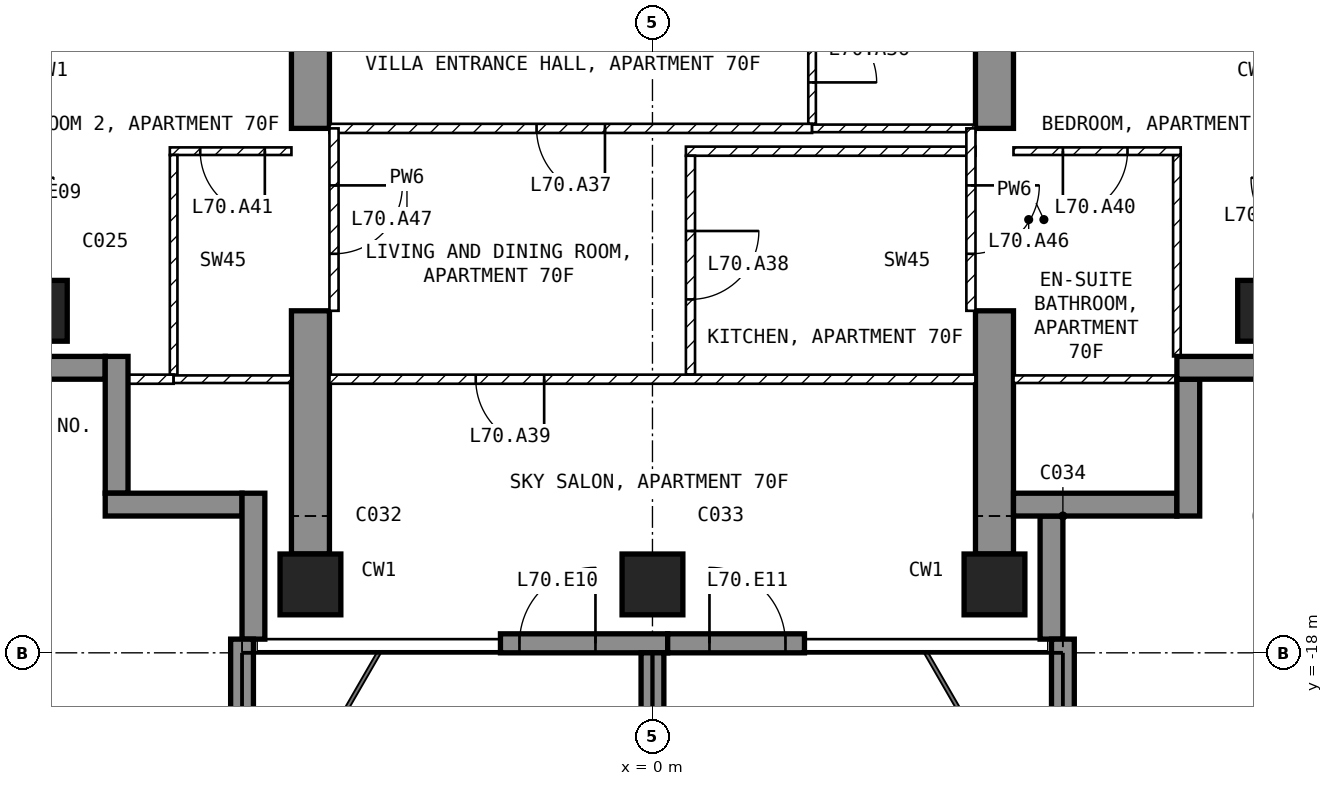
"""IFC4 building model, lengths in metres.
Left out: names, types, materials, properties, quantities, classifications, styles, units other than length and angle.
Written with IfcOpenShell. Run it as: python <this file> out.ifc"""

import sys

from ifc_helpers import new_model, si_unit, direction, frame, frame_2d, origin, origin_2d, place, context, subcontext, project, spatial, polyline, rectangle, outline, extrude, element, fill, save


model = new_model("IFC4")
c1 = context("Model", 3, precision=1e-05, world=origin(), true_north=direction((0.0, 1.0)))
c2 = subcontext(c1, "Body", "Model", "MODEL_VIEW")
j1 = project(units=[si_unit("LENGTHUNIT", "METRE"), si_unit("PLANEANGLEUNIT", "RADIAN")], contexts=[c1])
p1 = place(None, origin())
s1 = spatial("IfcSite", under=j1, at=p1, CompositionType="ELEMENT")
p2 = place(p1, origin())
s2 = spatial("IfcBuilding", under=s1, at=p2, CompositionType="ELEMENT")
p3 = place(p2, frame((0.0, 0.0, 274.5)))
s3 = spatial("IfcBuildingStorey", under=s2, at=p3, CompositionType="ELEMENT", Elevation=274.5)
for number, where, z_axis, x_axis in (
    (1, (-8.1, -13.5, -0.25), (0.0, 0.0, 1.0), (1.0, 0.0, 0.0)),
    (2, (-4.5, -17.1, -0.25), (0.0, 0.0, 1.0), (1.0, 0.0, 0.0)),
    (3, (0.0, -17.1, -0.25), (0.0, 0.0, 1.0), (1.0, 0.0, 0.0)),
    (4, (4.5, -17.1, -0.25), (0.0, 0.0, 1.0), (1.0, 0.0, 0.0)),
    (5, (8.1, -13.5, -0.25), (0.0, 0.0, 1.0), (1.0, 0.0, 0.0)),
):
    element("IfcColumn", number, at=place(p3, frame(where, z_axis=z_axis, x_axis=x_axis)), inside=s3, PredefinedType="COLUMN", context=c2, shape_type="SweptSolid", body=[
        extrude(rectangle(XDim=0.8, YDim=0.8, at=origin_2d()), origin(), (0.0, 0.0, 1.0), 3.5),
    ])
for number, where, z_axis, x_axis in (
    (6, (-4.75, -16.7, -0.25), (1.0, 0.0, 0.0), (0.0, 1.0, 0.0)),
    (7, (4.25, -16.7, -0.25), (1.0, 0.0, 0.0), (0.0, 1.0, 0.0)),
):
    element("IfcWall", number, at=place(p3, frame(where, z_axis=z_axis, x_axis=x_axis)), inside=s3, PredefinedType="SHEAR", context=c2, shape_type="SweptSolid", body=[
        extrude(outline(polyline([(0.0, 0.0), (3.2, 0.0), (3.2, 2.65), (5.6, 2.65), (5.6, 0.0), (7.7, 0.0), (7.7, 3.5), (0.0, 3.5), (0.0, 0.0)])), origin(), (0.0, 0.0, 1.0), 0.5),
    ])
p4 = place(p3, frame((-2.0, -17.875, 0.0), z_axis=(0.0, 0.0, 1.0), x_axis=(1.0, 0.0, 0.0)))
e8 = element("IfcWall", 8, at=p4, inside=s3, PredefinedType="SOLIDWALL", context=c2, shape_type="SweptSolid", body=[
    extrude(rectangle(XDim=2.2, YDim=0.25, at=frame_2d((1.1, 0.0))), origin(), (0.0, 0.0, 1.0), 3.25),
])
p5 = place(p4, frame((0.25, 0.0, 0.0)))
e9 = element("IfcOpeningElement", 9, at=p5, cuts=e8, PredefinedType="OPENING", context=c2, shape_type="SweptSolid", body=[
    extrude(rectangle(XDim=1.0, YDim=2.4, at=frame_2d((0.5, 1.2))), frame((0.0, 0.135, 0.0), z_axis=(0.0, -1.0, 0.0), x_axis=(1.0, 0.0, 0.0)), (0.0, 0.0, 1.0), 0.27),
])
p6 = place(p3, frame((0.2, -17.875, 0.0), z_axis=(0.0, 0.0, 1.0), x_axis=(1.0, 0.0, 0.0)))
e10 = element("IfcWall", 10, at=p6, inside=s3, PredefinedType="SOLIDWALL", context=c2, shape_type="SweptSolid", body=[
    extrude(rectangle(XDim=1.8, YDim=0.25, at=frame_2d((0.9, 0.0))), origin(), (0.0, 0.0, 1.0), 3.25),
])
p7 = place(p6, frame((0.55, 0.0, 0.0)))
e11 = element("IfcOpeningElement", 11, at=p7, cuts=e10, PredefinedType="OPENING", context=c2, shape_type="SweptSolid", body=[
    extrude(rectangle(XDim=1.0, YDim=2.4, at=frame_2d((0.5, 1.2))), frame((0.0, 0.135, 0.0), z_axis=(0.0, -1.0, 0.0), x_axis=(1.0, 0.0, 0.0)), (0.0, 0.0, 1.0), 0.27),
])
p8 = place(p3, frame((5.25, -17.82, 0.0), z_axis=(0.0, 0.0, 1.0), x_axis=(0.0, 1.0, 0.0)))
e12 = element("IfcWall", 12, at=p8, inside=s3, PredefinedType="SOLIDWALL", context=c2, shape_type="SweptSolid", body=[
    extrude(rectangle(XDim=1.62, YDim=0.3, at=frame_2d((0.81, 0.0))), origin(), (0.0, 0.0, 1.0), 3.25),
])
p9 = place(p3, frame((4.75, -16.05, 0.0), z_axis=(0.0, 0.0, 1.0), x_axis=(1.0, 0.0, 0.0)))
e13 = element("IfcWall", 13, at=p9, inside=s3, PredefinedType="SOLIDWALL", context=c2, shape_type="SweptSolid", body=[
    extrude(rectangle(XDim=2.15, YDim=0.3, at=frame_2d((1.075, 0.0))), origin(), (0.0, 0.0, 1.0), 3.25),
])
p10 = place(p3, frame((7.05, -16.2, 0.0), z_axis=(0.0, 0.0, 1.0), x_axis=(0.0, 1.0, 0.0)))
e14 = element("IfcWall", 14, at=p10, inside=s3, PredefinedType="SOLIDWALL", context=c2, shape_type="SweptSolid", body=[
    extrude(rectangle(XDim=1.8, YDim=0.3, at=frame_2d((0.9, 0.0))), origin(), (0.0, 0.0, 1.0), 3.25),
])
p11 = place(p3, frame((6.9, -14.25, 0.0), z_axis=(0.0, 0.0, 1.0), x_axis=(1.0, 0.0, 0.0)))
e15 = element("IfcWall", 15, at=p11, inside=s3, PredefinedType="SOLIDWALL", context=c2, shape_type="SweptSolid", body=[
    extrude(rectangle(XDim=1.85, YDim=0.3, at=frame_2d((0.925, 0.0))), origin(), (0.0, 0.0, 1.0), 3.25),
])
p12 = place(p3, frame((-8.75, -14.25, 0.0), z_axis=(0.0, 0.0, 1.0), x_axis=(1.0, 0.0, 0.0)))
e16 = element("IfcWall", 16, at=p12, inside=s3, PredefinedType="SOLIDWALL", context=c2, shape_type="SweptSolid", body=[
    extrude(rectangle(XDim=1.55, YDim=0.3, at=frame_2d((0.775, 0.0))), origin(), (0.0, 0.0, 1.0), 3.25),
])
p13 = place(p3, frame((-7.05, -14.1, 0.0), z_axis=(0.0, 0.0, 1.0), x_axis=(0.0, -1.0, 0.0)))
e17 = element("IfcWall", 17, at=p13, inside=s3, PredefinedType="SOLIDWALL", context=c2, shape_type="SweptSolid", body=[
    extrude(rectangle(XDim=1.8, YDim=0.3, at=frame_2d((0.9, 0.0))), origin(), (0.0, 0.0, 1.0), 3.25),
])
p14 = place(p3, frame((-7.2, -16.05, 0.0), z_axis=(0.0, 0.0, 1.0), x_axis=(1.0, 0.0, 0.0)))
e18 = element("IfcWall", 18, at=p14, inside=s3, PredefinedType="SOLIDWALL", context=c2, shape_type="SweptSolid", body=[
    extrude(rectangle(XDim=1.8, YDim=0.3, at=frame_2d((0.9, 0.0))), origin(), (0.0, 0.0, 1.0), 3.25),
])
p15 = place(p3, frame((-5.25, -15.9, 0.0), z_axis=(0.0, 0.0, 1.0), x_axis=(0.0, -1.0, 0.0)))
e19 = element("IfcWall", 19, at=p15, inside=s3, PredefinedType="SOLIDWALL", context=c2, shape_type="SweptSolid", body=[
    extrude(rectangle(XDim=1.92, YDim=0.3, at=frame_2d((0.96, 0.0))), origin(), (0.0, 0.0, 1.0), 3.25),
])
p16 = place(p3, frame((-5.4, -17.82, 0.0), z_axis=(0.0, 0.0, 1.0), x_axis=(0.0, -1.0, 0.0)))
e20 = element("IfcWall", 20, at=p16, inside=s3, PredefinedType="SOLIDWALL", context=c2, shape_type="SweptSolid", body=[
    extrude(rectangle(XDim=2.88, YDim=0.3, at=frame_2d((1.44, 0.0))), origin(), (0.0, 0.0, 1.0), 3.25),
])
p17 = place(p3, frame((0.0, -18.0, 0.0), z_axis=(0.0, 0.0, 1.0), x_axis=(0.0, -1.0, 0.0)))
e21 = element("IfcWall", 21, at=p17, inside=s3, PredefinedType="SOLIDWALL", context=c2, shape_type="SweptSolid", body=[
    extrude(rectangle(XDim=2.7, YDim=0.3, at=frame_2d((1.35, 0.0))), origin(), (0.0, 0.0, 1.0), 3.25),
])
p18 = place(p3, frame((5.4, -17.82, 0.0), z_axis=(0.0, 0.0, 1.0), x_axis=(0.0, -1.0, 0.0)))
e22 = element("IfcWall", 22, at=p18, inside=s3, PredefinedType="SOLIDWALL", context=c2, shape_type="SweptSolid", body=[
    extrude(rectangle(XDim=2.88, YDim=0.3, at=frame_2d((1.44, 0.0))), origin(), (0.0, 0.0, 1.0), 3.25),
])
p19 = place(p3, frame((2.1, -9.1, 0.0), z_axis=(0.0, 0.0, 1.0), x_axis=(0.0, -1.0, 0.0)))
e23 = element("IfcWall", 23, at=p19, inside=s3, PredefinedType="PARTITIONING", context=c2, shape_type="SweptSolid", body=[
    extrude(rectangle(XDim=1.94, YDim=0.1, at=frame_2d((0.97, 0.0))), origin(), (0.0, 0.0, 1.0), 3.25),
])
p20 = place(p19, frame((0.545, 0.0, 0.0)))
e24 = element("IfcOpeningElement", 24, at=p20, cuts=e23, PredefinedType="OPENING", context=c2, shape_type="SweptSolid", body=[
    extrude(rectangle(XDim=0.85, YDim=2.1, at=frame_2d((0.425, 1.05))), frame((0.0, 0.06, 0.0), z_axis=(0.0, -1.0, 0.0), x_axis=(1.0, 0.0, 0.0)), (0.0, 0.0, 1.0), 0.12),
])
p21 = place(p3, frame((2.1, -11.1, 0.0), z_axis=(0.0, 0.0, 1.0), x_axis=(-1.0, 0.0, 0.0)))
e25 = element("IfcWall", 25, at=p21, inside=s3, PredefinedType="PARTITIONING", context=c2, shape_type="SweptSolid", body=[
    extrude(rectangle(XDim=6.35, YDim=0.12, at=frame_2d((3.175, 0.0))), origin(), (0.0, 0.0, 1.0), 3.25),
])
p22 = place(p21, frame((2.725, 0.0, 0.0)))
e26 = element("IfcOpeningElement", 26, at=p22, cuts=e25, PredefinedType="OPENING", context=c2, shape_type="SweptSolid", body=[
    extrude(rectangle(XDim=0.9, YDim=2.1, at=frame_2d((0.45, 1.05))), frame((0.0, 0.07, 0.0), z_axis=(0.0, -1.0, 0.0), x_axis=(1.0, 0.0, 0.0)), (0.0, 0.0, 1.0), 0.14),
])
p23 = place(p3, frame((4.25, -11.1, 0.0), z_axis=(0.0, 0.0, 1.0), x_axis=(-1.0, 0.0, 0.0)))
e27 = element("IfcWall", 27, at=p23, inside=s3, PredefinedType="PARTITIONING", context=c2, shape_type="SweptSolid", body=[
    extrude(rectangle(XDim=2.15, YDim=0.1, at=frame_2d((1.075, 0.0))), origin(), (0.0, 0.0, 1.0), 3.25),
])
p24 = place(p3, frame((4.25, -11.4, 0.0), z_axis=(0.0, 0.0, 1.0), x_axis=(-1.0, 0.0, 0.0)))
e28 = element("IfcWall", 28, at=p24, inside=s3, PredefinedType="PARTITIONING", context=c2, shape_type="SweptSolid", body=[
    extrude(rectangle(XDim=3.81, YDim=0.12, at=frame_2d((1.905, 0.0))), origin(), (0.0, 0.0, 1.0), 3.25),
])
p25 = place(p3, frame((0.5, -11.46, 0.0), z_axis=(0.0, 0.0, 1.0), x_axis=(0.0, -1.0, 0.0)))
e29 = element("IfcWall", 29, at=p25, inside=s3, PredefinedType="PARTITIONING", context=c2, shape_type="SweptSolid", body=[
    extrude(rectangle(XDim=2.88, YDim=0.12, at=frame_2d((1.44, 0.0))), origin(), (0.0, 0.0, 1.0), 3.25),
])
p26 = place(p25, frame((0.99, 0.0, 0.0)))
e30 = element("IfcOpeningElement", 30, at=p26, cuts=e29, PredefinedType="OPENING", context=c2, shape_type="SweptSolid", body=[
    extrude(rectangle(XDim=0.9, YDim=2.1, at=frame_2d((0.45, 1.05))), frame((0.0, 0.07, 0.0), z_axis=(0.0, -1.0, 0.0), x_axis=(1.0, 0.0, 0.0)), (0.0, 0.0, 1.0), 0.14),
])
p27 = place(p3, frame((4.25, -14.4, 0.0), z_axis=(0.0, 0.0, 1.0), x_axis=(-1.0, 0.0, 0.0)))
e31 = element("IfcWall", 31, at=p27, inside=s3, PredefinedType="PARTITIONING", context=c2, shape_type="SweptSolid", body=[
    extrude(rectangle(XDim=8.5, YDim=0.12, at=frame_2d((4.25, 0.0))), origin(), (0.0, 0.0, 1.0), 3.25),
])
p28 = place(p27, frame((5.675, 0.0, 0.0)))
e32 = element("IfcOpeningElement", 32, at=p28, cuts=e31, PredefinedType="OPENING", context=c2, shape_type="SweptSolid", body=[
    extrude(rectangle(XDim=0.9, YDim=2.1, at=frame_2d((0.45, 1.05))), frame((0.0, 0.07, 0.0), z_axis=(0.0, -1.0, 0.0), x_axis=(1.0, 0.0, 0.0)), (0.0, 0.0, 1.0), 0.14),
])
p29 = place(p3, frame((6.9, -14.1, 0.0), z_axis=(0.0, 0.0, 1.0), x_axis=(0.0, 1.0, 0.0)))
e33 = element("IfcWall", 33, at=p29, inside=s3, PredefinedType="PARTITIONING", context=c2, shape_type="SweptSolid", body=[
    extrude(rectangle(XDim=2.65, YDim=0.1, at=frame_2d((1.325, 0.0))), origin(), (0.0, 0.0, 1.0), 3.25),
])
p30 = place(p3, frame((6.95, -11.4, 0.0), z_axis=(0.0, 0.0, 1.0), x_axis=(-1.0, 0.0, 0.0)))
e34 = element("IfcWall", 34, at=p30, inside=s3, PredefinedType="PARTITIONING", context=c2, shape_type="SweptSolid", body=[
    extrude(rectangle(XDim=2.2, YDim=0.1, at=frame_2d((1.1, 0.0))), origin(), (0.0, 0.0, 1.0), 3.25),
])
p31 = place(p30, frame((0.7, 0.0, 0.0)))
e35 = element("IfcOpeningElement", 35, at=p31, cuts=e34, PredefinedType="OPENING", context=c2, shape_type="SweptSolid", body=[
    extrude(rectangle(XDim=0.85, YDim=2.1, at=frame_2d((0.425, 1.05))), frame((0.0, 0.06, 0.0), z_axis=(0.0, -1.0, 0.0), x_axis=(1.0, 0.0, 0.0)), (0.0, 0.0, 1.0), 0.12),
])
p32 = place(p3, frame((7.12, -14.4, 0.0), z_axis=(0.0, 0.0, 1.0), x_axis=(-1.0, 0.0, 0.0)))
e36 = element("IfcWall", 36, at=p32, inside=s3, PredefinedType="PARTITIONING", context=c2, shape_type="SweptSolid", body=[
    extrude(rectangle(XDim=2.37, YDim=0.1, at=frame_2d((1.185, 0.0))), origin(), (0.0, 0.0, 1.0), 3.25),
])
p33 = place(p3, frame((-4.75, -11.4, 0.0), z_axis=(0.0, 0.0, 1.0), x_axis=(-1.0, 0.0, 0.0)))
e37 = element("IfcWall", 37, at=p33, inside=s3, PredefinedType="PARTITIONING", context=c2, shape_type="SweptSolid", body=[
    extrude(rectangle(XDim=1.6, YDim=0.1, at=frame_2d((0.8, 0.0))), origin(), (0.0, 0.0, 1.0), 3.25),
])
p34 = place(p33, frame((0.35, 0.0, 0.0)))
e38 = element("IfcOpeningElement", 38, at=p34, cuts=e37, PredefinedType="OPENING", context=c2, shape_type="SweptSolid", body=[
    extrude(rectangle(XDim=0.85, YDim=2.1, at=frame_2d((0.425, 1.05))), frame((0.0, 0.06, 0.0), z_axis=(0.0, -1.0, 0.0), x_axis=(1.0, 0.0, 0.0)), (0.0, 0.0, 1.0), 0.12),
])
p35 = place(p3, frame((-6.3, -11.45, 0.0), z_axis=(0.0, 0.0, 1.0), x_axis=(0.0, -1.0, 0.0)))
e39 = element("IfcWall", 39, at=p35, inside=s3, PredefinedType="PARTITIONING", context=c2, shape_type="SweptSolid", body=[
    extrude(rectangle(XDim=2.89, YDim=0.1, at=frame_2d((1.445, 0.0))), origin(), (0.0, 0.0, 1.0), 3.25),
])
p36 = place(p3, frame((-6.3, -14.4, 0.0), z_axis=(0.0, 0.0, 1.0), x_axis=(-1.0, 0.0, 0.0)))
e40 = element("IfcWall", 40, at=p36, inside=s3, PredefinedType="PARTITIONING", context=c2, shape_type="SweptSolid", body=[
    extrude(rectangle(XDim=0.82, YDim=0.12, at=frame_2d((0.41, 0.0))), origin(), (0.0, 0.0, 1.0), 3.25),
])
p37 = place(p3, frame((-4.75, -14.4, 0.0), z_axis=(0.0, 0.0, 1.0), x_axis=(-1.0, 0.0, 0.0)))
e41 = element("IfcWall", 41, at=p37, inside=s3, PredefinedType="PARTITIONING", context=c2, shape_type="SweptSolid", body=[
    extrude(rectangle(XDim=1.55, YDim=0.1, at=frame_2d((0.775, 0.0))), origin(), (0.0, 0.0, 1.0), 3.25),
])
p38 = place(p3, frame((4.19, -11.1, 0.0), z_axis=(0.0, 0.0, 1.0), x_axis=(0.0, -1.0, 0.0)))
e42 = element("IfcWall", 42, at=p38, inside=s3, PredefinedType="PARTITIONING", context=c2, shape_type="SweptSolid", body=[
    extrude(rectangle(XDim=2.4, YDim=0.12, at=frame_2d((1.2, 0.0))), origin(), (0.0, 0.0, 1.0), 2.4),
])
p39 = place(p38, frame((0.75, 0.0, 0.0)))
e43 = element("IfcOpeningElement", 43, at=p39, cuts=e42, PredefinedType="OPENING", context=c2, shape_type="SweptSolid", body=[
    extrude(rectangle(XDim=0.9, YDim=2.1, at=frame_2d((0.45, 1.05))), frame((0.0, 0.07, 0.0), z_axis=(0.0, -1.0, 0.0), x_axis=(1.0, 0.0, 0.0)), (0.0, 0.0, 1.0), 0.14),
])
p40 = place(p3, frame((-4.19, -11.1, 0.0), z_axis=(0.0, 0.0, 1.0), x_axis=(0.0, -1.0, 0.0)))
e44 = element("IfcWall", 44, at=p40, inside=s3, PredefinedType="PARTITIONING", context=c2, shape_type="SweptSolid", body=[
    extrude(rectangle(XDim=2.4, YDim=0.12, at=frame_2d((1.2, 0.0))), origin(), (0.0, 0.0, 1.0), 2.4),
])
p41 = place(p40, frame((0.75, 0.0, 0.0)))
e45 = element("IfcOpeningElement", 45, at=p41, cuts=e44, PredefinedType="OPENING", context=c2, shape_type="SweptSolid", body=[
    extrude(rectangle(XDim=0.9, YDim=2.1, at=frame_2d((0.45, 1.05))), frame((0.0, 0.07, 0.0), z_axis=(0.0, -1.0, 0.0), x_axis=(1.0, 0.0, 0.0)), (0.0, 0.0, 1.0), 0.14),
])
p42 = place(p5, origin())
e46 = element("IfcDoor", 46, at=p42, inside=s3, OperationType="SINGLE_SWING_RIGHT", PredefinedType="DOOR", context=c2, shape_type="SweptSolid", body=[
    extrude(rectangle(XDim=1.0, YDim=2.4, at=frame_2d((0.5, 1.2))), frame((0.0, 0.025, 0.0), z_axis=(0.0, -1.0, 0.0), x_axis=(1.0, 0.0, 0.0)), (0.0, 0.0, 1.0), 0.05),
])
fill(e9, e46)
p43 = place(p7, origin())
e47 = element("IfcDoor", 47, at=p43, inside=s3, OperationType="SINGLE_SWING_LEFT", PredefinedType="DOOR", context=c2, shape_type="SweptSolid", body=[
    extrude(rectangle(XDim=1.0, YDim=2.4, at=frame_2d((0.5, 1.2))), frame((0.0, 0.025, 0.0), z_axis=(0.0, -1.0, 0.0), x_axis=(1.0, 0.0, 0.0)), (0.0, 0.0, 1.0), 0.05),
])
fill(e11, e47)
p44 = place(p20, origin())
e48 = element("IfcDoor", 48, at=p44, inside=s3, OperationType="SINGLE_SWING_RIGHT", PredefinedType="DOOR", context=c2, shape_type="SweptSolid", body=[
    extrude(rectangle(XDim=0.85, YDim=2.1, at=frame_2d((0.425, 1.05))), frame((0.0, 0.025, 0.0), z_axis=(0.0, -1.0, 0.0), x_axis=(1.0, 0.0, 0.0)), (0.0, 0.0, 1.0), 0.05),
])
fill(e24, e48)
p45 = place(p22, origin())
e49 = element("IfcDoor", 49, at=p45, inside=s3, OperationType="SINGLE_SWING_LEFT", PredefinedType="DOOR", context=c2, shape_type="SweptSolid", body=[
    extrude(rectangle(XDim=0.9, YDim=2.1, at=frame_2d((0.45, 1.05))), frame((0.0, 0.025, 0.0), z_axis=(0.0, -1.0, 0.0), x_axis=(1.0, 0.0, 0.0)), (0.0, 0.0, 1.0), 0.05),
])
fill(e26, e49)
p46 = place(p26, origin())
e50 = element("IfcDoor", 50, at=p46, inside=s3, OperationType="SINGLE_SWING_LEFT", PredefinedType="DOOR", context=c2, shape_type="SweptSolid", body=[
    extrude(rectangle(XDim=0.9, YDim=2.1, at=frame_2d((0.45, 1.05))), frame((0.0, 0.025, 0.0), z_axis=(0.0, -1.0, 0.0), x_axis=(1.0, 0.0, 0.0)), (0.0, 0.0, 1.0), 0.05),
])
fill(e30, e50)
p47 = place(p28, origin())
e51 = element("IfcDoor", 51, at=p47, inside=s3, OperationType="SINGLE_SWING_LEFT", PredefinedType="DOOR", context=c2, shape_type="SweptSolid", body=[
    extrude(rectangle(XDim=0.9, YDim=2.1, at=frame_2d((0.45, 1.05))), frame((0.0, 0.025, 0.0), z_axis=(0.0, -1.0, 0.0), x_axis=(1.0, 0.0, 0.0)), (0.0, 0.0, 1.0), 0.05),
])
fill(e32, e51)
p48 = place(p31, origin())
e52 = element("IfcDoor", 52, at=p48, inside=s3, OperationType="SINGLE_SWING_RIGHT", PredefinedType="DOOR", context=c2, shape_type="SweptSolid", body=[
    extrude(rectangle(XDim=0.85, YDim=2.1, at=frame_2d((0.425, 1.05))), frame((0.0, 0.025, 0.0), z_axis=(0.0, -1.0, 0.0), x_axis=(1.0, 0.0, 0.0)), (0.0, 0.0, 1.0), 0.05),
])
fill(e35, e52)
p49 = place(p34, origin())
e53 = element("IfcDoor", 53, at=p49, inside=s3, OperationType="SINGLE_SWING_LEFT", PredefinedType="DOOR", context=c2, shape_type="SweptSolid", body=[
    extrude(rectangle(XDim=0.85, YDim=2.1, at=frame_2d((0.425, 1.05))), frame((0.0, 0.025, 0.0), z_axis=(0.0, -1.0, 0.0), x_axis=(1.0, 0.0, 0.0)), (0.0, 0.0, 1.0), 0.05),
])
fill(e38, e53)
p50 = place(p39, origin())
e54 = element("IfcDoor", 54, at=p50, inside=s3, OperationType="SINGLE_SWING_LEFT", PredefinedType="DOOR", context=c2, shape_type="SweptSolid", body=[
    extrude(rectangle(XDim=0.9, YDim=2.1, at=frame_2d((0.45, 1.05))), frame((0.0, 0.025, 0.0), z_axis=(0.0, -1.0, 0.0), x_axis=(1.0, 0.0, 0.0)), (0.0, 0.0, 1.0), 0.05),
])
fill(e43, e54)
p51 = place(p41, origin())
e55 = element("IfcDoor", 55, at=p51, inside=s3, OperationType="SINGLE_SWING_LEFT", PredefinedType="DOOR", context=c2, shape_type="SweptSolid", body=[
    extrude(rectangle(XDim=0.9, YDim=2.1, at=frame_2d((0.45, 1.05))), frame((0.0, 0.025, 0.0), z_axis=(0.0, -1.0, 0.0), x_axis=(1.0, 0.0, 0.0)), (0.0, 0.0, 1.0), 0.05),
])
fill(e45, e55)
save(model, sys.argv[1])
